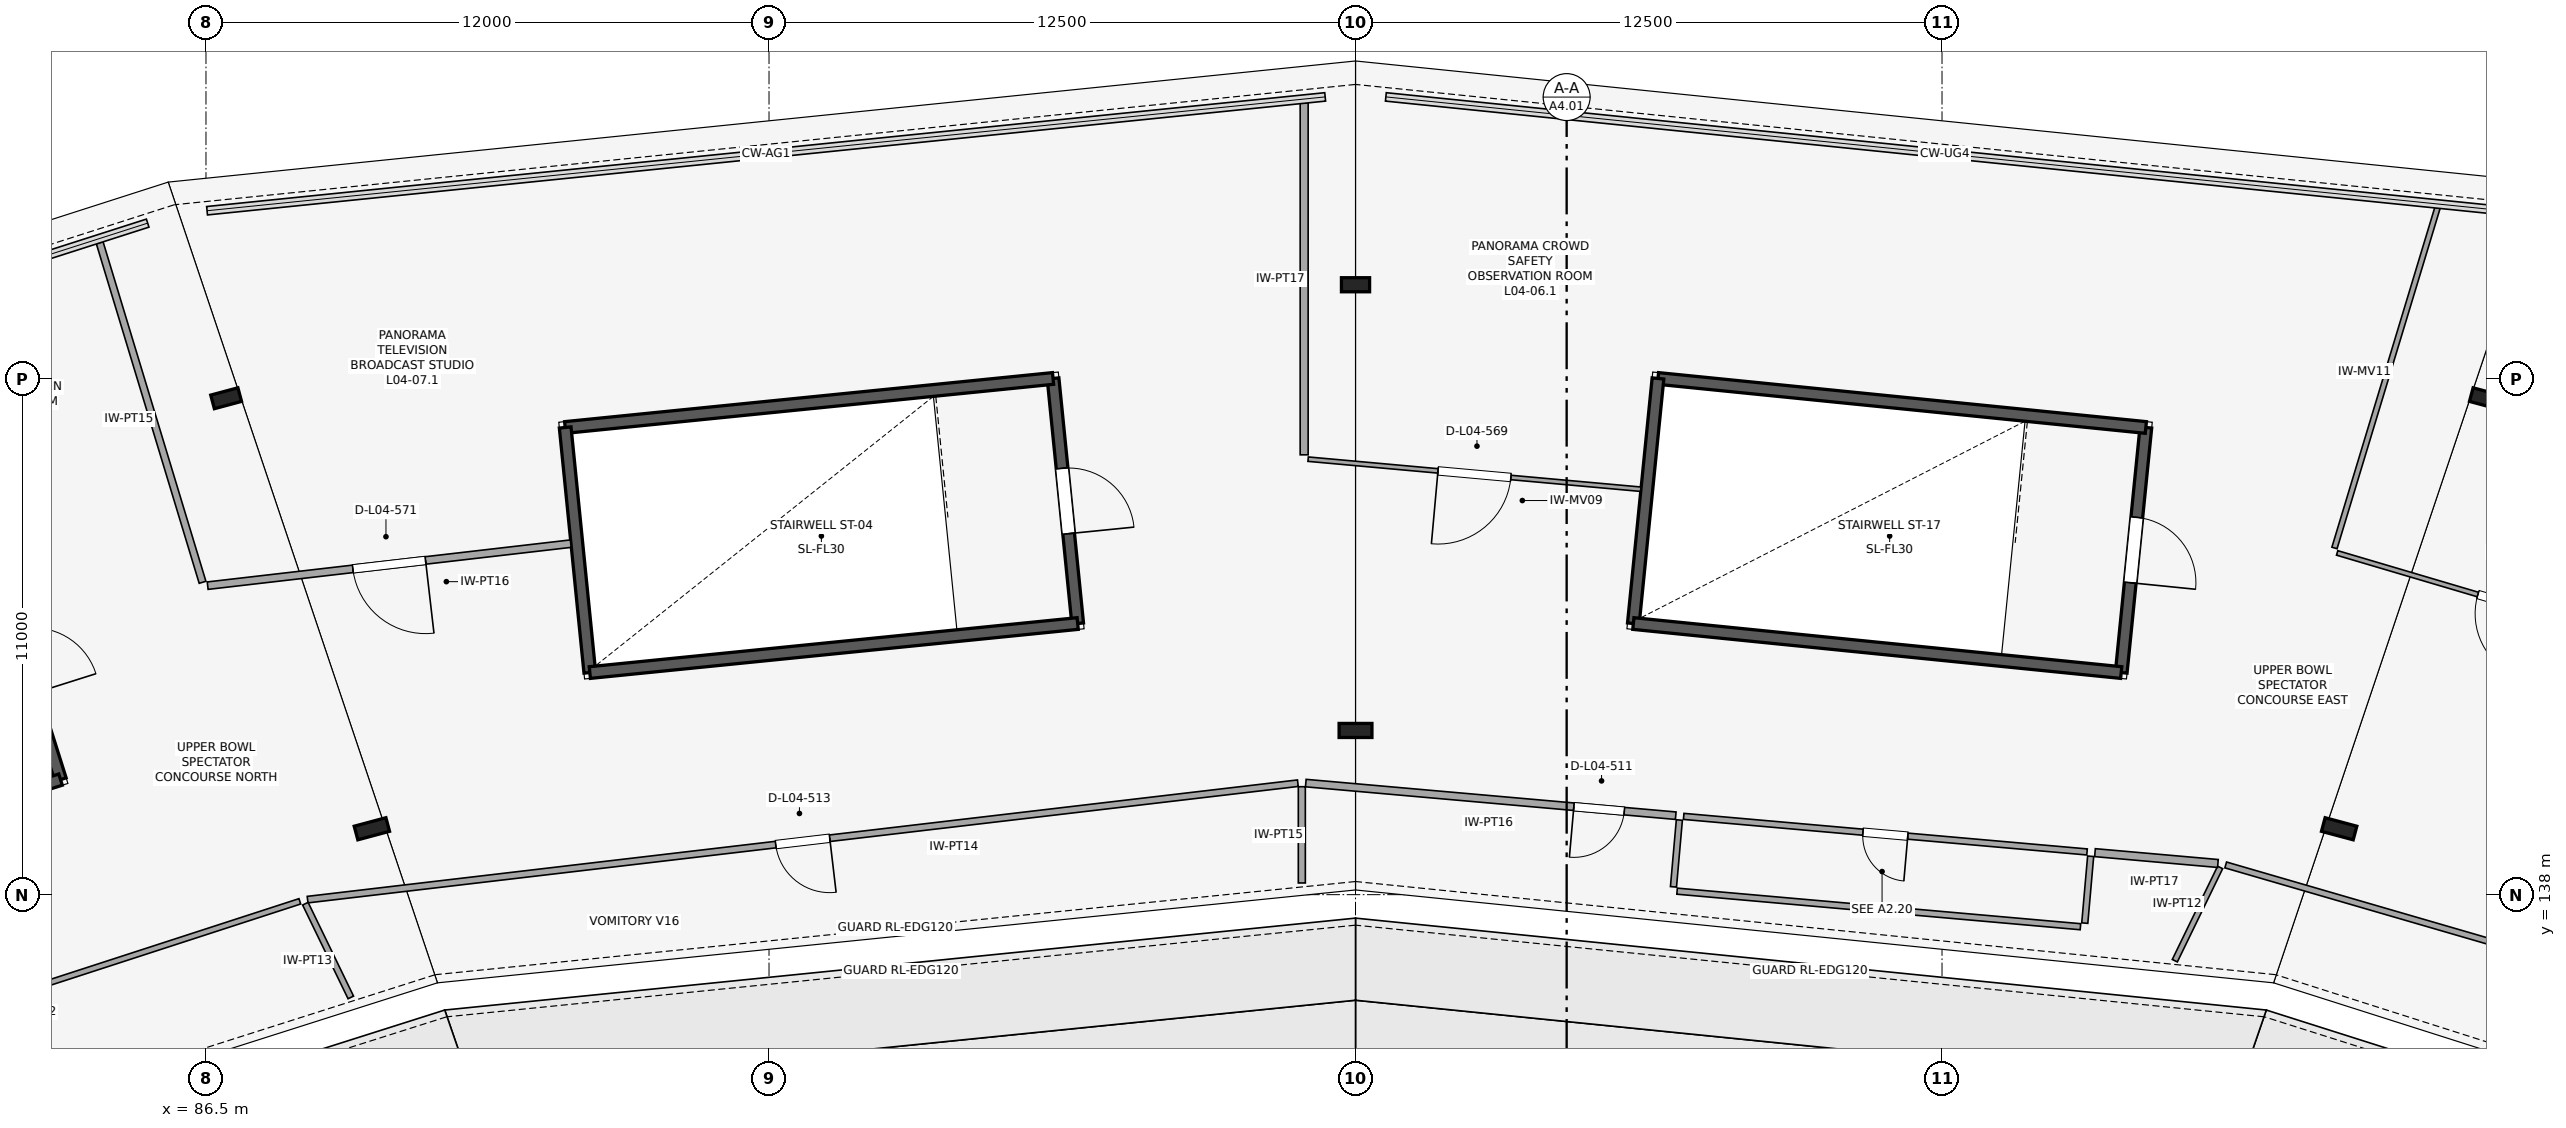
"""IFC4 building model, lengths in metres.
Left out: names, types, materials, properties, quantities, classifications, styles, units other than length and angle.
Written with IfcOpenShell. Run it as: python <this file> out.ifc"""

import sys

from ifc_helpers import new_model, si_unit, direction, frame, frame_2d, origin, origin_2d, place, context, subcontext, project, spatial, rectangle, i_section, extrude, element, fill, save


model = new_model("IFC4")
c1 = context("Model", 3, precision=1e-05, world=origin(), true_north=direction((0.0, 1.0)))
c2 = subcontext(c1, "Body", "Model", "MODEL_VIEW")
j1 = project(units=[si_unit("LENGTHUNIT", "METRE"), si_unit("PLANEANGLEUNIT", "RADIAN")], contexts=[c1])
p1 = place(None, origin())
s1 = spatial("IfcSite", under=j1, at=p1, CompositionType="ELEMENT")
p2 = place(p1, origin())
s2 = spatial("IfcBuilding", under=s1, at=p2, CompositionType="ELEMENT")
p3 = place(p2, frame((0.0, 0.0, 20.8)))
s3 = spatial("IfcBuildingStorey", under=s2, at=p3, CompositionType="ELEMENT", Elevation=20.8)
for number, where, z_axis, x_axis in (
    (1, (131.964, 139.404, 0.0), (0.0, 0.0, 1.0), (0.259, 0.966, 0.0)),
    (2, (111.0, 141.5, 0.0), (0.0, 0.0, 1.0), (0.0, 1.0, 0.0)),
    (3, (90.036, 139.404, 0.0), (0.0, 0.0, 1.0), (-0.259, 0.966, 0.0)),
):
    element("IfcColumn", number, at=place(p3, frame(where, z_axis=z_axis, x_axis=x_axis)), inside=s3, PredefinedType="COLUMN", context=c2, shape_type="SweptSolid", body=[
        extrude(i_section(OverallWidth=0.3, OverallDepth=0.7, WebThickness=0.017, FlangeThickness=0.032, FilletRadius=0.027, at=origin_2d()), origin(), (0.0, 0.0, 1.0), 5.4),
    ])
for number, where, z_axis, x_axis in (
    (4, (135.07, 148.581, 0.0), (0.0, 0.0, 1.0), (0.259, 0.966, 0.0)),
    (5, (111.0, 151.0, 0.0), (0.0, 0.0, 1.0), (0.0, 1.0, 0.0)),
    (6, (86.93, 148.581, 0.0), (0.0, 0.0, 1.0), (-0.259, 0.966, 0.0)),
):
    element("IfcColumn", number, at=place(p3, frame(where, z_axis=z_axis, x_axis=x_axis)), inside=s3, PredefinedType="COLUMN", context=c2, shape_type="SweptSolid", body=[
        extrude(i_section(OverallWidth=0.3, OverallDepth=0.6, WebThickness=0.015, FlangeThickness=0.03, FilletRadius=0.027, at=origin_2d()), origin(), (0.0, 0.0, 1.0), 5.4),
    ])
p4 = place(p3, frame((105.079, 143.779, 0.0), z_axis=(0.0, 0.0, 1.0), x_axis=(-0.100028593886, 0.994984562898, 0.0)))
e7 = element("IfcWall", 7, at=p4, inside=s3, PredefinedType="SHEAR", context=c2, shape_type="SweptSolid", body=[
    extrude(rectangle(XDim=5.25, YDim=0.25, at=frame_2d((2.625, 0.0))), origin(), (0.0, 0.0, 1.0), 3.2),
])
p5 = place(p4, frame((1.925, 0.0, 0.0)))
e8 = element("IfcOpeningElement", 8, at=p5, cuts=e7, PredefinedType="OPENING", context=c2, shape_type="SweptSolid", body=[
    extrude(rectangle(XDim=1.4, YDim=2.2, at=frame_2d((0.7, 1.1))), frame((0.0, 0.135, 0.0), z_axis=(0.0, -1.0, 0.0), x_axis=(1.0, 0.0, 0.0)), (0.0, 0.0, 1.0), 0.27),
])
p6 = place(p3, frame((104.553, 149.003, 0.0), z_axis=(0.0, 0.0, 1.0), x_axis=(-0.994985938948, -0.100014905366, 0.0)))
e9 = element("IfcWall", 9, at=p6, inside=s3, PredefinedType="SHEAR", context=c2, shape_type="SweptSolid", body=[
    extrude(rectangle(XDim=10.45, YDim=0.25, at=frame_2d((5.225, 0.0))), origin(), (0.0, 0.0, 1.0), 3.2),
])
p7 = place(p3, frame((94.156, 147.958, 0.0), z_axis=(0.0, 0.0, 1.0), x_axis=(0.100028593886, -0.994984562898, 0.0)))
e10 = element("IfcWall", 10, at=p7, inside=s3, PredefinedType="SHEAR", context=c2, shape_type="SweptSolid", body=[
    extrude(rectangle(XDim=5.25, YDim=0.25, at=frame_2d((2.625, 0.0))), origin(), (0.0, 0.0, 1.0), 3.2),
])
p8 = place(p3, frame((94.681, 142.734, 0.0), z_axis=(0.0, 0.0, 1.0), x_axis=(0.994985938948, 0.100014905366, 0.0)))
e11 = element("IfcWall", 11, at=p8, inside=s3, PredefinedType="SHEAR", context=c2, shape_type="SweptSolid", body=[
    extrude(rectangle(XDim=10.45, YDim=0.25, at=frame_2d((5.225, 0.0))), origin(), (0.0, 0.0, 1.0), 3.2),
])
p9 = place(p3, frame((83.4, 140.452, 0.0), z_axis=(0.0, 0.0, 1.0), x_axis=(-0.30152749866, 0.953457480726, 0.0)))
e12 = element("IfcWall", 12, at=p9, inside=s3, PredefinedType="SHEAR", context=c2, shape_type="SweptSolid", body=[
    extrude(rectangle(XDim=5.25, YDim=0.25, at=frame_2d((2.625, 0.0))), origin(), (0.0, 0.0, 1.0), 3.2),
])
p10 = place(p9, frame((1.925, 0.0, 0.0)))
e13 = element("IfcOpeningElement", 13, at=p10, cuts=e12, PredefinedType="OPENING", context=c2, shape_type="SweptSolid", body=[
    extrude(rectangle(XDim=1.4, YDim=2.2, at=frame_2d((0.7, 1.1))), frame((0.0, 0.135, 0.0), z_axis=(0.0, -1.0, 0.0), x_axis=(1.0, 0.0, 0.0)), (0.0, 0.0, 1.0), 0.27),
])
p11 = place(p3, frame((73.437, 137.301, 0.0), z_axis=(0.0, 0.0, 1.0), x_axis=(0.953459710305, 0.301520448438, 0.0)))
e14 = element("IfcWall", 14, at=p11, inside=s3, PredefinedType="SHEAR", context=c2, shape_type="SweptSolid", body=[
    extrude(rectangle(XDim=10.45, YDim=0.25, at=frame_2d((5.225, 0.0))), origin(), (0.0, 0.0, 1.0), 3.2),
])
p12 = place(p3, frame((127.319, 142.734, 0.0), z_axis=(0.0, 0.0, 1.0), x_axis=(0.10002396577, 0.994985028165, 0.0)))
e15 = element("IfcWall", 15, at=p12, inside=s3, PredefinedType="SHEAR", context=c2, shape_type="SweptSolid", body=[
    extrude(rectangle(XDim=5.25, YDim=0.25, at=frame_2d((2.625, 0.0))), origin(), (0.0, 0.0, 1.0), 3.2),
])
p13 = place(p12, frame((1.925, 0.0, 0.0)))
e16 = element("IfcOpeningElement", 16, at=p13, cuts=e15, PredefinedType="OPENING", context=c2, shape_type="SweptSolid", body=[
    extrude(rectangle(XDim=1.4, YDim=2.2, at=frame_2d((0.7, 1.1))), frame((0.0, 0.135, 0.0), z_axis=(0.0, -1.0, 0.0), x_axis=(1.0, 0.0, 0.0)), (0.0, 0.0, 1.0), 0.27),
])
p14 = place(p3, frame((127.844, 147.958, 0.0), z_axis=(0.0, 0.0, 1.0), x_axis=(-0.994988263568, 0.09999177647, 0.0)))
e17 = element("IfcWall", 17, at=p14, inside=s3, PredefinedType="SHEAR", context=c2, shape_type="SweptSolid", body=[
    extrude(rectangle(XDim=10.45, YDim=0.25, at=frame_2d((5.225, 0.0))), origin(), (0.0, 0.0, 1.0), 3.2),
])
p15 = place(p3, frame((117.447, 149.003, 0.0), z_axis=(0.0, 0.0, 1.0), x_axis=(-0.099982555566, -0.994989190184, 0.0)))
e18 = element("IfcWall", 18, at=p15, inside=s3, PredefinedType="SHEAR", context=c2, shape_type="SweptSolid", body=[
    extrude(rectangle(XDim=5.25, YDim=0.25, at=frame_2d((2.625, 0.0))), origin(), (0.0, 0.0, 1.0), 3.2),
])
p16 = place(p3, frame((116.922, 143.779, 0.0), z_axis=(0.0, 0.0, 1.0), x_axis=(0.994985705245, -0.100017230303, 0.0)))
e19 = element("IfcWall", 19, at=p16, inside=s3, PredefinedType="SHEAR", context=c2, shape_type="SweptSolid", body=[
    extrude(rectangle(XDim=10.45, YDim=0.25, at=frame_2d((5.225, 0.0))), origin(), (0.0, 0.0, 1.0), 3.2),
])
p17 = place(p3, frame((149.34, 132.883, 0.0), z_axis=(0.0, 0.0, 1.0), x_axis=(-0.960290143662, 0.279003297447, 0.0)))
e20 = element("IfcWall", 20, at=p17, inside=s3, PredefinedType="PARTITIONING", context=c2, shape_type="SweptSolid", body=[
    extrude(rectangle(XDim=20.612, YDim=0.13, at=frame_2d((10.306, 0.0))), origin(), (0.0, 0.0, 1.0), 3.89),
])
p18 = place(p17, frame((9.766, 0.0, 0.0)))
e21 = element("IfcOpeningElement", 21, at=p18, cuts=e20, PredefinedType="OPENING", context=c2, shape_type="SweptSolid", body=[
    extrude(rectangle(XDim=1.08, YDim=2.24, at=frame_2d((0.54, 1.12))), frame((0.0, 0.075, 0.0), z_axis=(0.0, -1.0, 0.0), x_axis=(1.0, 0.0, 0.0)), (0.0, 0.0, 1.0), 0.15),
])
p19 = place(p3, frame((128.462, 136.592, 0.0), z_axis=(0.0, 0.0, 1.0), x_axis=(0.436934602117, 0.899493275946, 0.0)))
e22 = element("IfcWall", 22, at=p19, inside=s3, PredefinedType="PARTITIONING", context=c2, shape_type="SweptSolid", body=[
    extrude(rectangle(XDim=2.21, YDim=0.12, at=frame_2d((1.105, 0.0))), origin(), (0.0, 0.0, 1.0), 3.89),
])
p20 = place(p3, frame((126.591, 138.91, 0.0), z_axis=(0.0, 0.0, 1.0), x_axis=(-0.996137131507, 0.087811247762, 0.0)))
e23 = element("IfcWall", 23, at=p20, inside=s3, PredefinedType="PARTITIONING", context=c2, shape_type="SweptSolid", body=[
    extrude(rectangle(XDim=8.63, YDim=0.13, at=frame_2d((4.315, 0.0))), origin(), (0.0, 0.0, 1.0), 3.89),
])
p21 = place(p20, frame((3.835, 0.0, 0.0)))
e24 = element("IfcOpeningElement", 24, at=p21, cuts=e23, PredefinedType="OPENING", context=c2, shape_type="SweptSolid", body=[
    extrude(rectangle(XDim=0.96, YDim=2.24, at=frame_2d((0.48, 1.12))), frame((0.0, 0.075, 0.0), z_axis=(0.0, -1.0, 0.0), x_axis=(1.0, 0.0, 0.0)), (0.0, 0.0, 1.0), 0.15),
])
p22 = place(p3, frame((126.45, 137.317, 0.0), z_axis=(0.0, 0.0, 1.0), x_axis=(-0.996136913361, 0.08781372239, 0.0)))
e25 = element("IfcWall", 25, at=p22, inside=s3, PredefinedType="PARTITIONING", context=c2, shape_type="SweptSolid", body=[
    extrude(rectangle(XDim=8.63, YDim=0.13, at=frame_2d((4.315, 0.0))), origin(), (0.0, 0.0, 1.0), 3.89),
])
p23 = place(p3, frame((126.668, 138.818, 0.0), z_axis=(0.0, 0.0, 1.0), x_axis=(-0.087764246596, -0.996141273625, 0.0)))
e26 = element("IfcWall", 26, at=p23, inside=s3, PredefinedType="PARTITIONING", context=c2, shape_type="SweptSolid", body=[
    extrude(rectangle(XDim=1.43, YDim=0.13, at=frame_2d((0.715, 0.0))), origin(), (0.0, 0.0, 1.0), 3.89),
])
p24 = place(p3, frame((117.902, 139.591, 0.0), z_axis=(0.0, 0.0, 1.0), x_axis=(-0.087749321419, -0.996142588483, 0.0)))
e27 = element("IfcWall", 27, at=p24, inside=s3, PredefinedType="PARTITIONING", context=c2, shape_type="SweptSolid", body=[
    extrude(rectangle(XDim=1.43, YDim=0.13, at=frame_2d((0.715, 0.0))), origin(), (0.0, 0.0, 1.0), 3.89),
])
p25 = place(p3, frame((129.38, 138.665, 0.0), z_axis=(0.0, 0.0, 1.0), x_axis=(-0.9961360632, 0.08782336587, 0.0)))
e28 = element("IfcWall", 28, at=p25, inside=s3, PredefinedType="PARTITIONING", context=c2, shape_type="SweptSolid", body=[
    extrude(rectangle(XDim=2.63, YDim=0.17, at=frame_2d((1.315, 0.0))), origin(), (0.0, 0.0, 1.0), 3.89),
])
p26 = place(p3, frame((117.825, 139.683, 0.0), z_axis=(0.0, 0.0, 1.0), x_axis=(-0.996133820569, 0.087848799188, 0.0)))
e29 = element("IfcWall", 29, at=p26, inside=s3, PredefinedType="PARTITIONING", context=c2, shape_type="SweptSolid", body=[
    extrude(rectangle(XDim=7.915, YDim=0.16, at=frame_2d((3.958, 0.0))), origin(), (0.0, 0.0, 1.0), 3.89),
])
p27 = place(p26, frame((1.1, 0.0, 0.0)))
e30 = element("IfcOpeningElement", 30, at=p27, cuts=e29, PredefinedType="OPENING", context=c2, shape_type="SweptSolid", body=[
    extrude(rectangle(XDim=1.08, YDim=2.38, at=frame_2d((0.54, 1.19))), frame((0.0, 0.09, 0.0), z_axis=(0.0, -1.0, 0.0), x_axis=(1.0, 0.0, 0.0)), (0.0, 0.0, 1.0), 0.18),
])
p28 = place(p3, frame((109.856, 138.249, 0.0), z_axis=(0.0, 0.0, 1.0), x_axis=(0.0, 1.0, 0.0)))
e31 = element("IfcWall", 31, at=p28, inside=s3, PredefinedType="PARTITIONING", context=c2, shape_type="SweptSolid", body=[
    extrude(rectangle(XDim=2.052, YDim=0.15, at=frame_2d((1.026, 0.0))), origin(), (0.0, 0.0, 1.0), 3.89),
])
p29 = place(p3, frame((109.771, 140.376, 0.0), z_axis=(0.0, 0.0, 1.0), x_axis=(-0.993156562859, -0.116790588879, 0.0)))
e32 = element("IfcWall", 32, at=p29, inside=s3, PredefinedType="PARTITIONING", context=c2, shape_type="SweptSolid", body=[
    extrude(rectangle(XDim=21.251, YDim=0.14, at=frame_2d((10.625, 0.0))), origin(), (0.0, 0.0, 1.0), 3.89),
])
p30 = place(p29, frame((10.046, 0.0, 0.0)))
e33 = element("IfcOpeningElement", 33, at=p30, cuts=e32, PredefinedType="OPENING", context=c2, shape_type="SweptSolid", body=[
    extrude(rectangle(XDim=1.16, YDim=2.24, at=frame_2d((0.58, 1.12))), frame((0.0, 0.08, 0.0), z_axis=(0.0, -1.0, 0.0), x_axis=(1.0, 0.0, 0.0)), (0.0, 0.0, 1.0), 0.16),
])
p31 = place(p3, frame((89.587, 135.809, 0.0), z_axis=(0.0, 0.0, 1.0), x_axis=(-0.436098180005, 0.899899092897, 0.0)))
e34 = element("IfcWall", 34, at=p31, inside=s3, PredefinedType="PARTITIONING", context=c2, shape_type="SweptSolid", body=[
    extrude(rectangle(XDim=2.221, YDim=0.13, at=frame_2d((1.11, 0.0))), origin(), (0.0, 0.0, 1.0), 3.89),
])
p32 = place(p3, frame((88.5, 137.858, 0.0), z_axis=(0.0, 0.0, 1.0), x_axis=(-0.951083486705, -0.308933975661, 0.0)))
e35 = element("IfcWall", 35, at=p32, inside=s3, PredefinedType="PARTITIONING", context=c2, shape_type="SweptSolid", body=[
    extrude(rectangle(XDim=18.983, YDim=0.12, at=frame_2d((9.491, 0.0))), origin(), (0.0, 0.0, 1.0), 3.89),
])
p33 = place(p32, frame((8.911, 0.0, 0.0)))
e36 = element("IfcOpeningElement", 36, at=p33, cuts=e35, PredefinedType="OPENING", context=c2, shape_type="SweptSolid", body=[
    extrude(rectangle(XDim=1.16, YDim=2.1, at=frame_2d((0.58, 1.05))), frame((0.0, 0.07, 0.0), z_axis=(0.0, -1.0, 0.0), x_axis=(1.0, 0.0, 0.0)), (0.0, 0.0, 1.0), 0.14),
])
p34 = place(p3, frame((139.301, 143.102, 0.0), z_axis=(0.0, 0.0, 1.0), x_axis=(-0.958974593553, 0.283492026201, 0.0)))
e37 = element("IfcWall", 37, at=p34, inside=s3, PredefinedType="PARTITIONING", context=c2, shape_type="SweptSolid", body=[
    extrude(rectangle(XDim=7.696, YDim=0.1, at=frame_2d((3.848, 0.0))), origin(), (0.0, 0.0, 1.0), 3.89),
])
p35 = place(p34, frame((3.128, 0.0, 0.0)))
e38 = element("IfcOpeningElement", 38, at=p35, cuts=e37, PredefinedType="OPENING", context=c2, shape_type="SweptSolid", body=[
    extrude(rectangle(XDim=1.44, YDim=2.24, at=frame_2d((0.72, 1.12))), frame((0.0, 0.06, 0.0), z_axis=(0.0, -1.0, 0.0), x_axis=(1.0, 0.0, 0.0)), (0.0, 0.0, 1.0), 0.12),
])
p36 = place(p3, frame((131.865, 145.389, 0.0), z_axis=(0.0, 0.0, 1.0), x_axis=(0.289801609593, 0.957086739579, 0.0)))
e39 = element("IfcWall", 39, at=p36, inside=s3, PredefinedType="MOVABLE", context=c2, shape_type="SweptSolid", body=[
    extrude(rectangle(XDim=7.573, YDim=0.115, at=frame_2d((3.787, 0.0))), origin(), (0.0, 0.0, 1.0), 3.89),
])
p37 = place(p3, frame((117.079, 146.642, 0.0), z_axis=(0.0, 0.0, 1.0), x_axis=(-0.995940866338, 0.090009948105, 0.0)))
e40 = element("IfcWall", 40, at=p37, inside=s3, PredefinedType="MOVABLE", context=c2, shape_type="SweptSolid", body=[
    extrude(rectangle(XDim=7.117, YDim=0.095, at=frame_2d((3.559, 0.0))), origin(), (0.0, 0.0, 1.0), 3.89),
])
p38 = place(p37, frame((2.779, 0.0, 0.0)))
e41 = element("IfcOpeningElement", 41, at=p38, cuts=e40, PredefinedType="OPENING", context=c2, shape_type="SweptSolid", body=[
    extrude(rectangle(XDim=1.56, YDim=2.1, at=frame_2d((0.78, 1.05))), frame((0.0, 0.057, 0.0), z_axis=(0.0, -1.0, 0.0), x_axis=(1.0, 0.0, 0.0)), (0.0, 0.0, 1.0), 0.115),
])
p39 = place(p3, frame((109.906, 147.375, 0.0), z_axis=(0.0, 0.0, 1.0), x_axis=(3.2559502e-05, 0.99999999947, 0.0)))
e42 = element("IfcWall", 42, at=p39, inside=s3, PredefinedType="PARTITIONING", context=c2, shape_type="SweptSolid", body=[
    extrude(rectangle(XDim=7.498, YDim=0.17, at=frame_2d((3.749, 0.0))), origin(), (0.0, 0.0, 1.0), 3.89),
])
p40 = place(p3, frame((94.274, 145.481, 0.0), z_axis=(0.0, 0.0, 1.0), x_axis=(-0.993374026279, -0.114926254239, 0.0)))
e43 = element("IfcWall", 43, at=p40, inside=s3, PredefinedType="PARTITIONING", context=c2, shape_type="SweptSolid", body=[
    extrude(rectangle(XDim=7.79, YDim=0.16, at=frame_2d((3.895, 0.0))), origin(), (0.0, 0.0, 1.0), 3.89),
])
p41 = place(p40, frame((3.115, 0.0, 0.0)))
e44 = element("IfcOpeningElement", 44, at=p41, cuts=e43, PredefinedType="OPENING", context=c2, shape_type="SweptSolid", body=[
    extrude(rectangle(XDim=1.56, YDim=2.24, at=frame_2d((0.78, 1.12))), frame((0.0, 0.09, 0.0), z_axis=(0.0, -1.0, 0.0), x_axis=(1.0, 0.0, 0.0)), (0.0, 0.0, 1.0), 0.18),
])
p42 = place(p3, frame((86.427, 144.658, 0.0), z_axis=(0.0, 0.0, 1.0), x_axis=(-0.289864051143, 0.957067830331, 0.0)))
e45 = element("IfcWall", 45, at=p42, inside=s3, PredefinedType="PARTITIONING", context=c2, shape_type="SweptSolid", body=[
    extrude(rectangle(XDim=7.563, YDim=0.15, at=frame_2d((3.782, 0.0))), origin(), (0.0, 0.0, 1.0), 3.89),
])
p43 = place(p5, frame((1.4, 0.0, 0.0), z_axis=(0.0, 0.0, 1.0), x_axis=(-1.0, 0.0, 0.0)))
e46 = element("IfcDoor", 46, at=p43, inside=s3, OperationType="SINGLE_SWING_RIGHT", PredefinedType="DOOR", context=c2, shape_type="SweptSolid", body=[
    extrude(rectangle(XDim=1.4, YDim=2.2, at=frame_2d((0.7, 1.1))), frame((0.0, 0.025, 0.0), z_axis=(0.0, -1.0, 0.0), x_axis=(1.0, 0.0, 0.0)), (0.0, 0.0, 1.0), 0.05),
])
fill(e8, e46)
p44 = place(p13, frame((1.4, 0.0, 0.0), z_axis=(0.0, 0.0, 1.0), x_axis=(-1.0, 0.0, 0.0)))
e47 = element("IfcDoor", 47, at=p44, inside=s3, OperationType="SINGLE_SWING_RIGHT", PredefinedType="DOOR", context=c2, shape_type="SweptSolid", body=[
    extrude(rectangle(XDim=1.4, YDim=2.2, at=frame_2d((0.7, 1.1))), frame((0.0, 0.025, 0.0), z_axis=(0.0, -1.0, 0.0), x_axis=(1.0, 0.0, 0.0)), (0.0, 0.0, 1.0), 0.05),
])
fill(e16, e47)
p45 = place(p21, origin())
e48 = element("IfcDoor", 48, at=p45, inside=s3, OperationType="SINGLE_SWING_LEFT", PredefinedType="DOOR", context=c2, shape_type="SweptSolid", body=[
    extrude(rectangle(XDim=0.96, YDim=2.24, at=frame_2d((0.48, 1.12))), frame((0.0, 0.025, 0.0), z_axis=(0.0, -1.0, 0.0), x_axis=(1.0, 0.0, 0.0)), (0.0, 0.0, 1.0), 0.05),
])
fill(e24, e48)
p46 = place(p27, origin())
e49 = element("IfcDoor", 49, at=p46, inside=s3, OperationType="SINGLE_SWING_RIGHT", PredefinedType="DOOR", context=c2, shape_type="SweptSolid", body=[
    extrude(rectangle(XDim=1.08, YDim=2.38, at=frame_2d((0.54, 1.19))), frame((0.0, 0.025, 0.0), z_axis=(0.0, -1.0, 0.0), x_axis=(1.0, 0.0, 0.0)), (0.0, 0.0, 1.0), 0.05),
])
fill(e30, e49)
p47 = place(p30, origin())
e50 = element("IfcDoor", 50, at=p47, inside=s3, OperationType="SINGLE_SWING_LEFT", PredefinedType="DOOR", context=c2, shape_type="SweptSolid", body=[
    extrude(rectangle(XDim=1.16, YDim=2.24, at=frame_2d((0.58, 1.12))), frame((0.0, 0.025, 0.0), z_axis=(0.0, -1.0, 0.0), x_axis=(1.0, 0.0, 0.0)), (0.0, 0.0, 1.0), 0.05),
])
fill(e33, e50)
p48 = place(p35, origin())
e51 = element("IfcDoor", 51, at=p48, inside=s3, OperationType="SINGLE_SWING_LEFT", PredefinedType="DOOR", context=c2, shape_type="SweptSolid", body=[
    extrude(rectangle(XDim=1.44, YDim=2.24, at=frame_2d((0.72, 1.12))), frame((0.0, 0.025, 0.0), z_axis=(0.0, -1.0, 0.0), x_axis=(1.0, 0.0, 0.0)), (0.0, 0.0, 1.0), 0.05),
])
fill(e38, e51)
p49 = place(p38, origin())
e52 = element("IfcDoor", 52, at=p49, inside=s3, OperationType="SINGLE_SWING_RIGHT", PredefinedType="DOOR", context=c2, shape_type="SweptSolid", body=[
    extrude(rectangle(XDim=1.56, YDim=2.1, at=frame_2d((0.78, 1.05))), frame((0.0, 0.025, 0.0), z_axis=(0.0, -1.0, 0.0), x_axis=(1.0, 0.0, 0.0)), (0.0, 0.0, 1.0), 0.05),
])
fill(e41, e52)
p50 = place(p41, origin())
e53 = element("IfcDoor", 53, at=p50, inside=s3, OperationType="SINGLE_SWING_LEFT", PredefinedType="DOOR", context=c2, shape_type="SweptSolid", body=[
    extrude(rectangle(XDim=1.56, YDim=2.24, at=frame_2d((0.78, 1.12))), frame((0.0, 0.025, 0.0), z_axis=(0.0, -1.0, 0.0), x_axis=(1.0, 0.0, 0.0)), (0.0, 0.0, 1.0), 0.05),
])
fill(e44, e53)
save(model, sys.argv[1])
